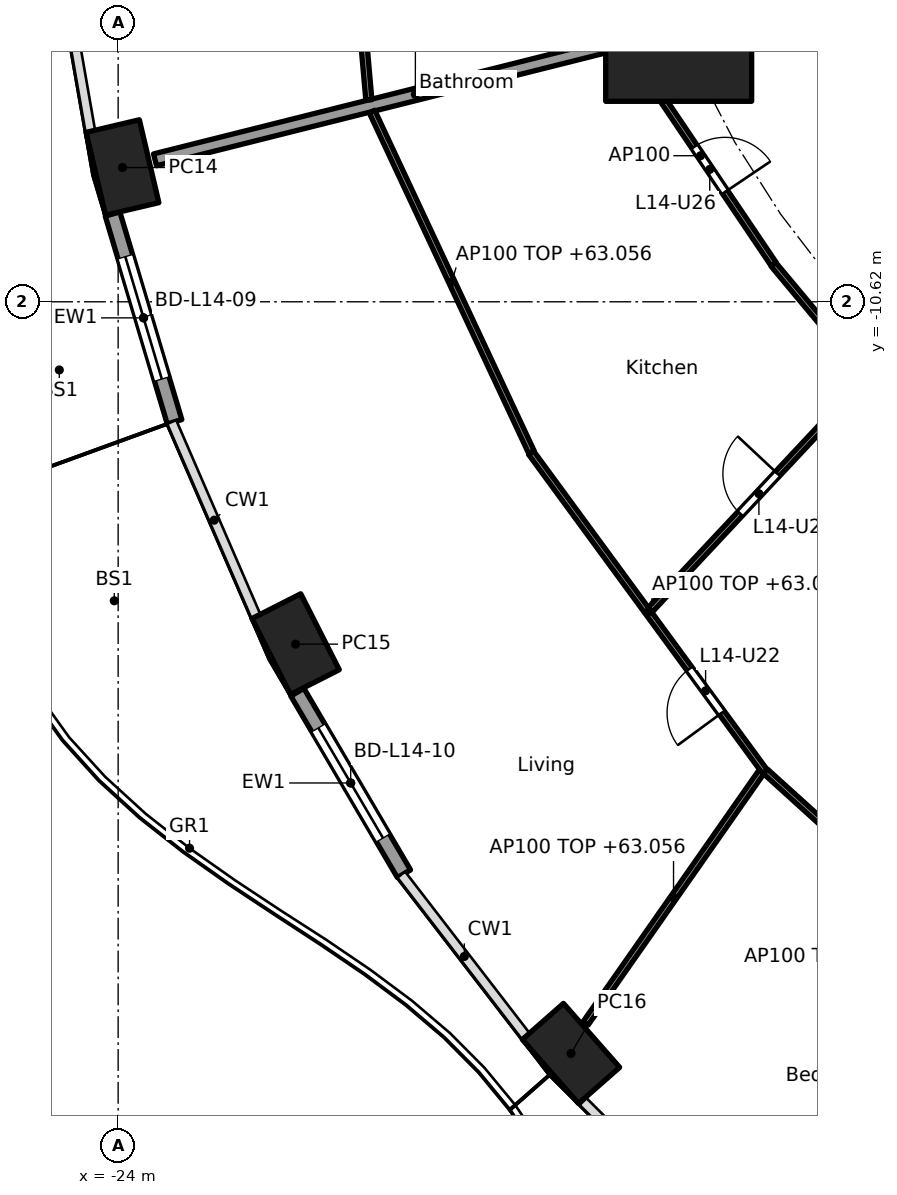
"""IFC4 building model, lengths in metres.
Left out: names, types, materials, properties, quantities, classifications, styles, units other than length and angle.
Written with IfcOpenShell. Run it as: python <this file> out.ifc"""

import sys

from ifc_helpers import new_model, si_unit, direction, frame, frame_2d, origin, origin_2d, place, context, subcontext, project, spatial, rectangle, hollow_rectangle, extrude, element, fill, save


model = new_model("IFC4")
c1 = context("Model", 3, precision=1e-05, world=origin(), true_north=direction((0.0, 1.0)))
c2 = subcontext(c1, "Body", "Model", "MODEL_VIEW")
j1 = project(units=[si_unit("LENGTHUNIT", "METRE"), si_unit("PLANEANGLEUNIT", "RADIAN")], contexts=[c1])
p1 = place(None, origin())
s1 = spatial("IfcSite", under=j1, at=p1, CompositionType="ELEMENT")
p2 = place(p1, origin())
s2 = spatial("IfcBuilding", under=s1, at=p2, CompositionType="ELEMENT")
p3 = place(p2, frame((0.0, 0.0, 60.3)))
s3 = spatial("IfcBuildingStorey", under=s2, at=p3, CompositionType="ELEMENT", Elevation=60.3)
for number, where, z_axis, x_axis in (
    (1, (-23.929, -8.412, 0.0), (0.0, 0.0, 1.0), (0.229, -0.973, 0.0)),
    (2, (-21.082, -16.25, 0.0), (0.0, 0.0, 1.0), (0.452, -0.892, 0.0)),
    (3, (-16.552, -22.981, 0.0), (0.0, 0.0, 1.0), (0.66, -0.751, 0.0)),
):
    element("IfcColumn", number, at=place(p3, frame(where, z_axis=z_axis, x_axis=x_axis)), inside=s3, PredefinedType="COLUMN", context=c2, shape_type="SweptSolid", body=[
        extrude(hollow_rectangle(XDim=1.4, YDim=0.9, WallThickness=0.05, at=origin_2d()), origin(), (0.0, 0.0, 1.0), 3.7),
    ])
p4 = place(p3, frame((-14.782, -6.123, 0.0), z_axis=(0.0, 0.0, 1.0), x_axis=(1.0, 0.0, 0.0)))
e4 = element("IfcColumn", 4, at=p4, inside=s3, PredefinedType="COLUMN", context=c2, shape_type="SweptSolid", body=[
    extrude(rectangle(XDim=2.4, YDim=2.4, at=origin_2d()), origin(), (0.0, 0.0, 1.0), 3.7),
])
p5 = place(p3, frame((-23.073, -12.593, 0.0), z_axis=(0.0, 0.0, 1.0), x_axis=(-0.285871309426, 0.958268018065, 0.0)))
e5 = element("IfcWall", 5, at=p5, inside=s3, PredefinedType="SOLIDWALL", context=c2, shape_type="SweptSolid", body=[
    extrude(rectangle(XDim=3.565, YDim=0.25, at=frame_2d((1.783, 0.0))), origin(), (0.0, 0.0, 1.0), 3.44),
])
p6 = place(p5, frame((0.733, 0.0, 0.0)))
e6 = element("IfcOpeningElement", 6, at=p6, cuts=e5, PredefinedType="OPENING", context=c2, shape_type="SweptSolid", body=[
    extrude(rectangle(XDim=2.1, YDim=2.4, at=frame_2d((1.05, 1.2))), frame((0.0, 0.135, 0.0), z_axis=(0.0, -1.0, 0.0), x_axis=(1.0, 0.0, 0.0)), (0.0, 0.0, 1.0), 0.27),
])
p7 = place(p3, frame((-19.3, -20.026, 0.0), z_axis=(0.0, 0.0, 1.0), x_axis=(-0.506311160839, 0.862350861546, 0.0)))
e7 = element("IfcWall", 7, at=p7, inside=s3, PredefinedType="SOLIDWALL", context=c2, shape_type="SweptSolid", body=[
    extrude(rectangle(XDim=3.462, YDim=0.25, at=frame_2d((1.731, 0.0))), origin(), (0.0, 0.0, 1.0), 3.44),
])
p8 = place(p7, frame((0.681, 0.0, 0.0)))
e8 = element("IfcOpeningElement", 8, at=p8, cuts=e7, PredefinedType="OPENING", context=c2, shape_type="SweptSolid", body=[
    extrude(rectangle(XDim=2.1, YDim=2.4, at=frame_2d((1.05, 1.2))), frame((0.0, 0.135, 0.0), z_axis=(0.0, -1.0, 0.0), x_axis=(1.0, 0.0, 0.0)), (0.0, 0.0, 1.0), 0.27),
])
p9 = place(p3, frame((-14.831, -6.135, 0.0), z_axis=(0.0, 0.0, 1.0), x_axis=(-0.969884949569, -0.243563512454, 0.0)))
e9 = element("IfcWall", 9, at=p9, inside=s3, PredefinedType="PARTITIONING", context=c2, shape_type="SweptSolid", body=[
    extrude(rectangle(XDim=8.829, YDim=0.2, at=frame_2d((4.415, 0.0))), origin(), (0.0, 0.0, 1.0), 2.756),
])
p10 = place(p3, frame((-12.635, -5.134, 0.0), z_axis=(0.0, 0.0, 1.0), x_axis=(0.707106781187, -0.707106781187, 0.0)))
e10 = element("IfcWall", 10, at=p10, inside=s3, PredefinedType="PARTITIONING", context=c2, shape_type="SweptSolid", body=[
    extrude(rectangle(XDim=10.609, YDim=0.2, at=frame_2d((5.305, 0.0))), origin(), (0.0, 0.0, 1.0), 3.44),
])
p11 = place(p3, frame((-20.518, -0.05, 0.0), z_axis=(0.0, 0.0, 1.0), x_axis=(0.088143415068, -0.996107794558, 0.0)))
e11 = element("IfcWall", 11, at=p11, inside=s3, PredefinedType="PARTITIONING", context=c2, shape_type="SweptSolid", body=[
    extrude(rectangle(XDim=7.279, YDim=0.1, at=frame_2d((3.64, 0.0))), origin(), (0.0, 0.0, 1.0), 2.756),
])
p12 = place(p3, frame((-15.627, -6.432, 0.0), z_axis=(0.0, 0.0, 1.0), x_axis=(0.559112679527, -0.829091678641, 0.0)))
e12 = element("IfcWall", 12, at=p12, inside=s3, PredefinedType="PARTITIONING", context=c2, shape_type="SweptSolid", body=[
    extrude(rectangle(XDim=4.308, YDim=0.1, at=frame_2d((2.154, 0.0))), origin(), (0.0, 0.0, 1.0), 3.44),
])
p13 = place(p12, frame((1.975, 0.0, 0.0)))
e13 = element("IfcOpeningElement", 13, at=p13, cuts=e12, PredefinedType="OPENING", context=c2, shape_type="SweptSolid", body=[
    extrude(rectangle(XDim=0.9, YDim=2.1, at=frame_2d((0.45, 1.05))), frame((0.0, 0.06, 0.0), z_axis=(0.0, -1.0, 0.0), x_axis=(1.0, 0.0, 0.0)), (0.0, 0.0, 1.0), 0.12),
])
p14 = place(p3, frame((-19.826, -7.491, 0.0), z_axis=(0.0, 0.0, 1.0), x_axis=(0.423926333401, -0.905696673202, 0.0)))
e14 = element("IfcWall", 14, at=p14, inside=s3, PredefinedType="PARTITIONING", context=c2, shape_type="SweptSolid", body=[
    extrude(rectangle(XDim=6.188, YDim=0.1, at=frame_2d((3.094, 0.0))), origin(), (0.0, 0.0, 1.0), 2.756),
])
p15 = place(p3, frame((-13.222, -10.007, 0.0), z_axis=(0.0, 0.0, 1.0), x_axis=(0.64083455704, -0.767679015282, 0.0)))
e15 = element("IfcWall", 15, at=p15, inside=s3, PredefinedType="PARTITIONING", context=c2, shape_type="SweptSolid", body=[
    extrude(rectangle(XDim=4.837, YDim=0.1, at=frame_2d((2.418, 0.0))), origin(), (0.0, 0.0, 1.0), 2.756),
])
p16 = place(p3, frame((-17.211, -13.1, 0.0), z_axis=(0.0, 0.0, 1.0), x_axis=(0.591191311491, -0.806531359104, 0.0)))
e16 = element("IfcWall", 16, at=p16, inside=s3, PredefinedType="PARTITIONING", context=c2, shape_type="SweptSolid", body=[
    extrude(rectangle(XDim=6.51, YDim=0.1, at=frame_2d((3.255, 0.0))), origin(), (0.0, 0.0, 1.0), 2.756),
])
p17 = place(p16, frame((4.407, 0.0, 0.0)))
e17 = element("IfcOpeningElement", 17, at=p17, cuts=e16, PredefinedType="OPENING", context=c2, shape_type="SweptSolid", body=[
    extrude(rectangle(XDim=0.9, YDim=2.1, at=frame_2d((0.45, 1.05))), frame((0.0, 0.06, 0.0), z_axis=(0.0, -1.0, 0.0), x_axis=(1.0, 0.0, 0.0)), (0.0, 0.0, 1.0), 0.12),
])
p18 = place(p3, frame((-8.953, -8.958, 0.0), z_axis=(0.0, 0.0, 1.0), x_axis=(-0.683322485948, -0.730116689439, 0.0)))
e18 = element("IfcWall", 18, at=p18, inside=s3, PredefinedType="PARTITIONING", context=c2, shape_type="SweptSolid", body=[
    extrude(rectangle(XDim=9.219, YDim=0.1, at=frame_2d((4.609, 0.0))), origin(), (0.0, 0.0, 1.0), 2.687),
])
p19 = place(p18, frame((6.149, 0.0, 0.0)))
e19 = element("IfcOpeningElement", 19, at=p19, cuts=e18, PredefinedType="OPENING", context=c2, shape_type="SweptSolid", body=[
    extrude(rectangle(XDim=0.9, YDim=2.1, at=frame_2d((0.45, 1.05))), frame((0.0, 0.06, 0.0), z_axis=(0.0, -1.0, 0.0), x_axis=(1.0, 0.0, 0.0)), (0.0, 0.0, 1.0), 0.12),
])
p20 = place(p3, frame((-13.42, -18.351, 0.0), z_axis=(0.0, 0.0, 1.0), x_axis=(-0.573127875153, -0.819465947262, 0.0)))
e20 = element("IfcWall", 20, at=p20, inside=s3, PredefinedType="PARTITIONING", context=c2, shape_type="SweptSolid", body=[
    extrude(rectangle(XDim=5.047, YDim=0.1, at=frame_2d((2.523, 0.0))), origin(), (0.0, 0.0, 1.0), 2.756),
])
p21 = place(p3, frame((-13.355, -18.343, 0.0), z_axis=(0.0, 0.0, 1.0), x_axis=(0.741722263338, -0.670707152242, 0.0)))
e21 = element("IfcWall", 21, at=p21, inside=s3, PredefinedType="PARTITIONING", context=c2, shape_type="SweptSolid", body=[
    extrude(rectangle(XDim=6.109, YDim=0.1, at=frame_2d((3.055, 0.0))), origin(), (0.0, 0.0, 1.0), 2.756),
])
p22 = place(p6, origin())
e22 = element("IfcDoor", 22, at=p22, inside=s3, OperationType="SLIDING_TO_LEFT", PredefinedType="DOOR", context=c2, shape_type="SweptSolid", body=[
    extrude(rectangle(XDim=2.1, YDim=2.4, at=frame_2d((1.05, 1.2))), frame((0.0, 0.025, 0.0), z_axis=(0.0, -1.0, 0.0), x_axis=(1.0, 0.0, 0.0)), (0.0, 0.0, 1.0), 0.05),
])
fill(e6, e22)
p23 = place(p8, origin())
e23 = element("IfcDoor", 23, at=p23, inside=s3, OperationType="SLIDING_TO_LEFT", PredefinedType="DOOR", context=c2, shape_type="SweptSolid", body=[
    extrude(rectangle(XDim=2.1, YDim=2.4, at=frame_2d((1.05, 1.2))), frame((0.0, 0.025, 0.0), z_axis=(0.0, -1.0, 0.0), x_axis=(1.0, 0.0, 0.0)), (0.0, 0.0, 1.0), 0.05),
])
fill(e8, e23)
p24 = place(p17, frame((0.9, 0.0, 0.0), x_axis=(-1.0, 0.0, 0.0)))
e24 = element("IfcDoor", 24, at=p24, inside=s3, OperationType="SINGLE_SWING_LEFT", PredefinedType="DOOR", context=c2, shape_type="SweptSolid", body=[
    extrude(rectangle(XDim=0.9, YDim=2.1, at=frame_2d((0.45, 1.05))), frame((0.0, 0.025, 0.0), z_axis=(0.0, -1.0, 0.0), x_axis=(1.0, 0.0, 0.0)), (0.0, 0.0, 1.0), 0.05),
])
fill(e17, e24)
p25 = place(p19, frame((0.9, 0.0, 0.0), x_axis=(-1.0, 0.0, 0.0)))
e25 = element("IfcDoor", 25, at=p25, inside=s3, OperationType="SINGLE_SWING_RIGHT", PredefinedType="DOOR", context=c2, shape_type="SweptSolid", body=[
    extrude(rectangle(XDim=0.9, YDim=2.1, at=frame_2d((0.45, 1.05))), frame((0.0, 0.025, 0.0), z_axis=(0.0, -1.0, 0.0), x_axis=(1.0, 0.0, 0.0)), (0.0, 0.0, 1.0), 0.05),
])
fill(e19, e25)
p26 = place(p13, origin())
e26 = element("IfcDoor", 26, at=p26, inside=s3, OperationType="SINGLE_SWING_RIGHT", PredefinedType="DOOR", context=c2, shape_type="SweptSolid", body=[
    extrude(rectangle(XDim=0.9, YDim=2.1, at=frame_2d((0.45, 1.05))), frame((0.0, 0.025, 0.0), z_axis=(0.0, -1.0, 0.0), x_axis=(1.0, 0.0, 0.0)), (0.0, 0.0, 1.0), 0.05),
])
fill(e13, e26)
save(model, sys.argv[1])
